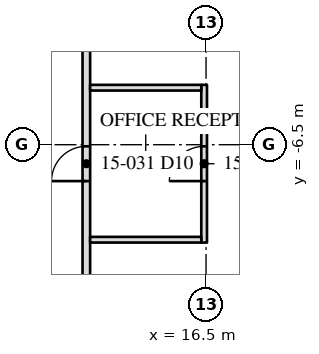
"""IFC4 building model, lengths in metres.
Left out: names, types, materials, properties, quantities, classifications, styles, units other than length and angle.
Written with IfcOpenShell. Run it as: python <this file> out.ifc"""

import sys

from ifc_helpers import new_model, si_unit, direction, frame, frame_2d, origin, place, context, subcontext, project, spatial, rectangle, extrude, element, fill, save


model = new_model("IFC4")
c1 = context("Model", 3, precision=1e-05, world=origin(), true_north=direction((0.0, 1.0)))
c2 = subcontext(c1, "Body", "Model", "MODEL_VIEW")
j1 = project(units=[si_unit("LENGTHUNIT", "METRE"), si_unit("PLANEANGLEUNIT", "RADIAN")], contexts=[c1])
p1 = place(None, origin())
s1 = spatial("IfcSite", under=j1, at=p1, CompositionType="ELEMENT")
p2 = place(p1, origin())
s2 = spatial("IfcBuilding", under=s1, at=p2, CompositionType="ELEMENT")
p3 = place(p2, frame((0.0, 0.0, 65.2)))
s3 = spatial("IfcBuildingStorey", under=s2, at=p3, CompositionType="ELEMENT", Elevation=65.2)
p4 = place(p3, frame((13.35, -13.45, 0.0), z_axis=(0.0, 0.0, 1.0), x_axis=(0.0, 1.0, 0.0)))
e1 = element("IfcWall", 1, at=p4, inside=s3, PredefinedType="PARTITIONING", context=c2, shape_type="SweptSolid", body=[
    extrude(rectangle(XDim=26.7, YDim=0.2, at=frame_2d((13.35, 0.0))), origin(), (0.0, 0.0, 1.0), 3.91),
])
p5 = place(p4, frame((5.992, 0.0, 0.0)))
e2 = element("IfcOpeningElement", 2, at=p5, cuts=e1, PredefinedType="OPENING", context=c2, shape_type="SweptSolid", body=[
    extrude(rectangle(XDim=0.915, YDim=2.134, at=frame_2d((0.458, 1.067))), frame((0.0, 0.11, 0.0), z_axis=(0.0, -1.0, 0.0), x_axis=(1.0, 0.0, 0.0)), (0.0, 0.0, 1.0), 0.22),
])
p6 = place(p3, frame((16.45, -9.075, 0.0), z_axis=(0.0, 0.0, 1.0), x_axis=(0.0, 1.0, 0.0)))
e3 = element("IfcWall", 3, at=p6, inside=s3, PredefinedType="PARTITIONING", context=c2, shape_type="SweptSolid", body=[
    extrude(rectangle(XDim=4.15, YDim=0.15, at=frame_2d((2.075, 0.0))), origin(), (0.0, 0.0, 1.0), 3.91),
])
p7 = place(p6, frame((1.617, 0.0, 0.0)))
e4 = element("IfcOpeningElement", 4, at=p7, cuts=e3, PredefinedType="OPENING", context=c2, shape_type="SweptSolid", body=[
    extrude(rectangle(XDim=0.915, YDim=2.134, at=frame_2d((0.458, 1.067))), frame((0.0, 0.085, 0.0), z_axis=(0.0, -1.0, 0.0), x_axis=(1.0, 0.0, 0.0)), (0.0, 0.0, 1.0), 0.17),
])
for number, where, z_axis, x_axis in (
    (5, (16.375, -9.0, 0.0), (0.0, 0.0, 1.0), (-1.0, 0.0, 0.0)),
    (6, (16.375, -5.0, 0.0), (0.0, 0.0, 1.0), (-1.0, 0.0, 0.0)),
):
    element("IfcWall", number, at=place(p3, frame(where, z_axis=z_axis, x_axis=x_axis)), inside=s3, PredefinedType="PARTITIONING", context=c2, shape_type="SweptSolid", body=[
        extrude(rectangle(XDim=2.925, YDim=0.15, at=frame_2d((1.462, 0.0))), origin(), (0.0, 0.0, 1.0), 3.91),
    ])
p8 = place(p7, origin())
e7 = element("IfcDoor", 7, at=p8, inside=s3, OperationType="SINGLE_SWING_LEFT", PredefinedType="DOOR", context=c2, shape_type="SweptSolid", body=[
    extrude(rectangle(XDim=0.915, YDim=2.134, at=frame_2d((0.458, 1.067))), frame((0.0, 0.025, 0.0), z_axis=(0.0, -1.0, 0.0), x_axis=(1.0, 0.0, 0.0)), (0.0, 0.0, 1.0), 0.05),
])
fill(e4, e7)
p9 = place(p5, origin())
e8 = element("IfcDoor", 8, at=p9, inside=s3, OperationType="SINGLE_SWING_LEFT", PredefinedType="DOOR", context=c2, shape_type="SweptSolid", body=[
    extrude(rectangle(XDim=0.915, YDim=2.134, at=frame_2d((0.458, 1.067))), frame((0.0, 0.025, 0.0), z_axis=(0.0, -1.0, 0.0), x_axis=(1.0, 0.0, 0.0)), (0.0, 0.0, 1.0), 0.05),
])
fill(e2, e8)
save(model, sys.argv[1])
